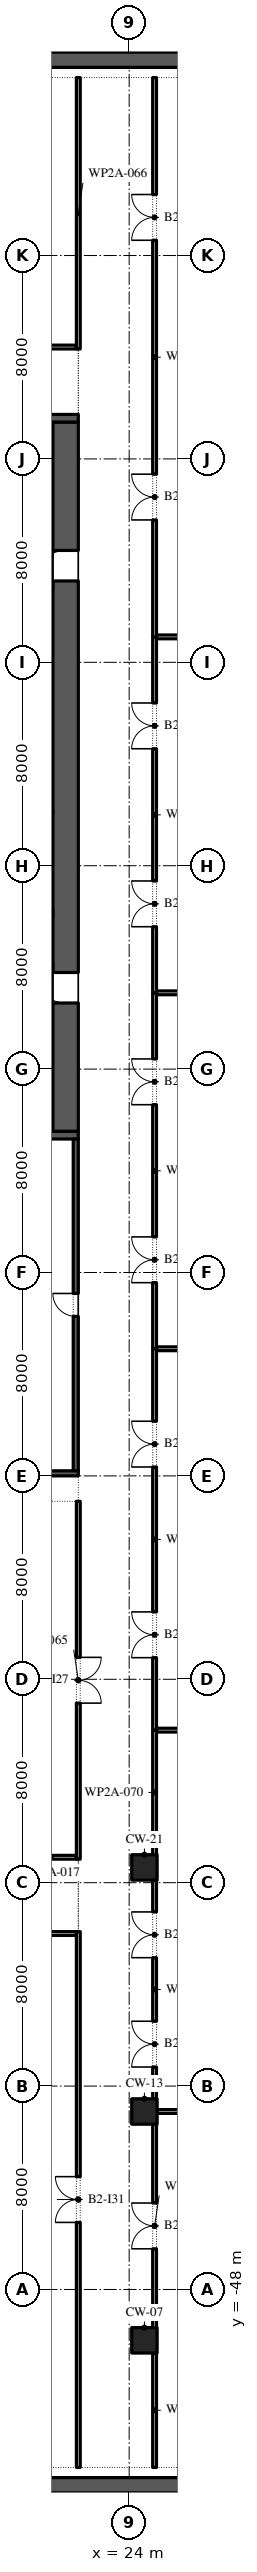
"""IFC4 building model, lengths in metres.
Left out: names, types, materials, properties, quantities, classifications, styles, units other than length and angle.
Written with IfcOpenShell. Run it as: python <this file> out.ifc"""

import sys

from ifc_helpers import new_model, si_unit, direction, frame, frame_2d, origin, origin_2d, place, context, subcontext, project, spatial, rectangle, extrude, element, fill, save


model = new_model("IFC4")
c1 = context("Model", 3, precision=1e-05, world=origin(), true_north=direction((0.0, 1.0)))
c2 = subcontext(c1, "Body", "Model", "MODEL_VIEW")
j1 = project(units=[si_unit("LENGTHUNIT", "METRE"), si_unit("PLANEANGLEUNIT", "RADIAN")], contexts=[c1])
p1 = place(None, origin())
s1 = spatial("IfcSite", under=j1, at=p1, CompositionType="ELEMENT")
p2 = place(p1, origin())
s2 = spatial("IfcBuilding", under=s1, at=p2, CompositionType="ELEMENT")
p3 = place(p2, frame((0.0, 0.0, -10.4)))
s3 = spatial("IfcBuildingStorey", under=s2, at=p3, CompositionType="ELEMENT", Elevation=-10.4)
for number, where, z_axis, x_axis in (
    (1, (-48.0, -55.7, -0.3), (0.0, 0.0, 1.0), (1.0, 0.0, 0.0)),
    (2, (-48.0, 39.7, -0.3), (0.0, 0.0, 1.0), (1.0, 0.0, 0.0)),
):
    element("IfcWall", number, at=place(p3, frame(where, z_axis=z_axis, x_axis=x_axis)), inside=s3, PredefinedType="SOLIDWALL", context=c2, shape_type="SweptSolid", body=[
        extrude(rectangle(XDim=96.0, YDim=0.6, at=frame_2d((48.0, 0.0))), origin(), (0.0, 0.0, 1.0), 5.5),
    ])
for number, where, z_axis, x_axis in (
    (3, (24.6, -50.0, -0.3), (0.0, 0.0, 1.0), (1.0, 0.0, 0.0)),
    (4, (24.6, -41.0, -0.3), (0.0, 0.0, 1.0), (1.0, 0.0, 0.0)),
    (5, (24.6, -31.4, -0.3), (0.0, 0.0, 1.0), (1.0, 0.0, 0.0)),
):
    element("IfcColumn", number, at=place(p3, frame(where, z_axis=z_axis, x_axis=x_axis)), inside=s3, PredefinedType="COLUMN", context=c2, shape_type="SweptSolid", body=[
        extrude(rectangle(XDim=1.0, YDim=1.0, at=origin_2d()), origin(), (0.0, 0.0, 1.0), 5.5),
    ])
p4 = place(p3, frame((21.5, -2.45, 0.0), z_axis=(0.0, 0.0, 1.0), x_axis=(0.0, 1.0, 0.0)))
e6 = element("IfcWall", 6, at=p4, inside=s3, PredefinedType="SHEAR", context=c2, shape_type="SweptSolid", body=[
    extrude(rectangle(XDim=27.9, YDim=1.0, at=frame_2d((13.95, 0.0))), origin(), (0.0, 0.0, 1.0), 4.9),
])
p5 = place(p4, frame((5.05, 0.0, 0.0)))
e7 = element("IfcOpeningElement", 7, at=p5, cuts=e6, PredefinedType="OPENING", context=c2, shape_type="SweptSolid", body=[
    extrude(rectangle(XDim=1.2, YDim=2.1, at=frame_2d((0.6, 1.05))), frame((0.0, 0.51, 0.0), z_axis=(0.0, -1.0, 0.0), x_axis=(1.0, 0.0, 0.0)), (0.0, 0.0, 1.0), 1.02),
])
p6 = place(p4, frame((21.65, 0.0, 0.0)))
e8 = element("IfcOpeningElement", 8, at=p6, cuts=e6, PredefinedType="OPENING", context=c2, shape_type="SweptSolid", body=[
    extrude(rectangle(XDim=1.2, YDim=2.1, at=frame_2d((0.6, 1.05))), frame((0.0, 0.51, 0.0), z_axis=(0.0, -1.0, 0.0), x_axis=(1.0, 0.0, 0.0)), (0.0, 0.0, 1.0), 1.02),
])
for number, where, z_axis, x_axis in (
    (9, (10.0, -2.6, 0.0), (0.0, 0.0, 1.0), (1.0, 0.0, 0.0)),
    (10, (10.0, 25.6, 0.0), (0.0, 0.0, 1.0), (1.0, 0.0, 0.0)),
):
    element("IfcWall", number, at=place(p3, frame(where, z_axis=z_axis, x_axis=x_axis)), inside=s3, PredefinedType="SHEAR", context=c2, shape_type="SweptSolid", body=[
        extrude(rectangle(XDim=12.0, YDim=0.3, at=frame_2d((6.0, 0.0))), origin(), (0.0, 0.0, 1.0), 4.9),
    ])
for number, where, z_axis, x_axis in (
    (11, (17.3, 4.0, 0.0), (0.0, 0.0, 1.0), (1.0, 0.0, 0.0)),
    (12, (17.3, 19.0, 0.0), (0.0, 0.0, 1.0), (1.0, 0.0, 0.0)),
):
    element("IfcWall", number, at=place(p3, frame(where, z_axis=z_axis, x_axis=x_axis)), inside=s3, PredefinedType="SHEAR", context=c2, shape_type="SweptSolid", body=[
        extrude(rectangle(XDim=3.7, YDim=0.3, at=frame_2d((1.85, 0.0))), origin(), (0.0, 0.0, 1.0), 4.9),
    ])
p7 = place(p3, frame((21.9, -15.8, 0.0), z_axis=(0.0, 0.0, 1.0), x_axis=(0.0, 1.0, 0.0)))
e13 = element("IfcWall", 13, at=p7, inside=s3, PredefinedType="SHEAR", context=c2, shape_type="SweptSolid", body=[
    extrude(rectangle(XDim=13.05, YDim=0.2, at=frame_2d((6.525, 0.0))), origin(), (0.0, 0.0, 1.0), 4.9),
])
p8 = place(p7, frame((6.075, 0.0, 0.0)))
e14 = element("IfcOpeningElement", 14, at=p8, cuts=e13, PredefinedType="OPENING", context=c2, shape_type="SweptSolid", body=[
    extrude(rectangle(XDim=0.9, YDim=2.1, at=frame_2d((0.45, 1.05))), frame((0.0, 0.11, 0.0), z_axis=(0.0, -1.0, 0.0), x_axis=(1.0, 0.0, 0.0)), (0.0, 0.0, 1.0), 0.22),
])
p9 = place(p3, frame((10.0, -15.9, 0.0), z_axis=(0.0, 0.0, 1.0), x_axis=(1.0, 0.0, 0.0)))
e15 = element("IfcWall", 15, at=p9, inside=s3, PredefinedType="SHEAR", context=c2, shape_type="SweptSolid", body=[
    extrude(rectangle(XDim=12.0, YDim=0.2, at=frame_2d((6.0, 0.0))), origin(), (0.0, 0.0, 1.0), 4.9),
])
p10 = place(p3, frame((25.1, -41.0, 0.0), z_axis=(0.0, 0.0, 1.0), x_axis=(1.0, 0.0, 0.0)))
e16 = element("IfcWall", 16, at=p10, inside=s3, PredefinedType="PARTITIONING", context=c2, shape_type="SweptSolid", body=[
    extrude(rectangle(XDim=5.8, YDim=0.15, at=frame_2d((2.9, 0.0))), origin(), (0.0, 0.0, 1.0), 4.9),
])
p11 = place(p3, frame((11.0, -34.0, 0.0), z_axis=(0.0, 0.0, 1.0), x_axis=(1.0, 0.0, 0.0)))
e17 = element("IfcWall", 17, at=p11, inside=s3, PredefinedType="PARTITIONING", context=c2, shape_type="SweptSolid", body=[
    extrude(rectangle(XDim=10.925, YDim=0.15, at=frame_2d((5.462, 0.0))), origin(), (0.0, 0.0, 1.0), 4.9),
])
p12 = place(p3, frame((19.9, -31.0, 0.0), z_axis=(0.0, 0.0, 1.0), x_axis=(1.0, 0.0, 0.0)))
e18 = element("IfcWall", 18, at=p12, inside=s3, PredefinedType="PARTITIONING", context=c2, shape_type="SweptSolid", body=[
    extrude(rectangle(XDim=2.025, YDim=0.15, at=frame_2d((1.013, 0.0))), origin(), (0.0, 0.0, 1.0), 4.9),
])
p13 = place(p3, frame((25.075, -26.0, 0.0), z_axis=(0.0, 0.0, 1.0), x_axis=(1.0, 0.0, 0.0)))
e19 = element("IfcWall", 19, at=p13, inside=s3, PredefinedType="PARTITIONING", context=c2, shape_type="SweptSolid", body=[
    extrude(rectangle(XDim=7.411, YDim=0.15, at=frame_2d((3.705, 0.0))), origin(), (0.0, 0.0, 1.0), 4.9),
])
p14 = place(p3, frame((25.075, -11.0, 0.0), z_axis=(0.0, 0.0, 1.0), x_axis=(1.0, 0.0, 0.0)))
e20 = element("IfcWall", 20, at=p14, inside=s3, PredefinedType="PARTITIONING", context=c2, shape_type="SweptSolid", body=[
    extrude(rectangle(XDim=6.625, YDim=0.15, at=frame_2d((3.312, 0.0))), origin(), (0.0, 0.0, 1.0), 4.9),
])
p15 = place(p3, frame((25.075, 3.0, 0.0), z_axis=(0.0, 0.0, 1.0), x_axis=(1.0, 0.0, 0.0)))
e21 = element("IfcWall", 21, at=p15, inside=s3, PredefinedType="PARTITIONING", context=c2, shape_type="SweptSolid", body=[
    extrude(rectangle(XDim=16.425, YDim=0.15, at=frame_2d((8.212, 0.0))), origin(), (0.0, 0.0, 1.0), 4.9),
])
p16 = place(p3, frame((25.075, 17.0, 0.0), z_axis=(0.0, 0.0, 1.0), x_axis=(1.0, 0.0, 0.0)))
e22 = element("IfcWall", 22, at=p16, inside=s3, PredefinedType="PARTITIONING", context=c2, shape_type="SweptSolid", body=[
    extrude(rectangle(XDim=21.925, YDim=0.15, at=frame_2d((10.962, 0.0))), origin(), (0.0, 0.0, 1.0), 4.9),
])
p17 = place(p3, frame((0.0, 28.4, 0.0), z_axis=(0.0, 0.0, 1.0), x_axis=(1.0, 0.0, 0.0)))
e23 = element("IfcWall", 23, at=p17, inside=s3, PredefinedType="PARTITIONING", context=c2, shape_type="SweptSolid", body=[
    extrude(rectangle(XDim=21.925, YDim=0.15, at=frame_2d((10.962, 0.0))), origin(), (0.0, 0.0, 1.0), 4.9),
])
p18 = place(p17, frame((10.062, 0.0, 0.0)))
e24 = element("IfcOpeningElement", 24, at=p18, cuts=e23, PredefinedType="OPENING", context=c2, shape_type="SweptSolid", body=[
    extrude(rectangle(XDim=1.8, YDim=2.1, at=frame_2d((0.9, 1.05))), frame((0.0, 0.085, 0.0), z_axis=(0.0, -1.0, 0.0), x_axis=(1.0, 0.0, 0.0)), (0.0, 0.0, 1.0), 0.17),
])
p19 = place(p3, frame((22.0, -55.0, 0.0), z_axis=(0.0, 0.0, 1.0), x_axis=(0.0, 1.0, 0.0)))
e25 = element("IfcWall", 25, at=p19, inside=s3, PredefinedType="PARTITIONING", context=c2, shape_type="SweptSolid", body=[
    extrude(rectangle(XDim=21.075, YDim=0.15, at=frame_2d((10.538, 0.0))), origin(), (0.0, 0.0, 1.0), 4.9),
])
p20 = place(p19, frame((9.637, 0.0, 0.0)))
e26 = element("IfcOpeningElement", 26, at=p20, cuts=e25, PredefinedType="OPENING", context=c2, shape_type="SweptSolid", body=[
    extrude(rectangle(XDim=1.8, YDim=2.1, at=frame_2d((0.9, 1.05))), frame((0.0, 0.085, 0.0), z_axis=(0.0, -1.0, 0.0), x_axis=(1.0, 0.0, 0.0)), (0.0, 0.0, 1.0), 0.17),
])
p21 = place(p3, frame((22.0, -31.075, 0.0), z_axis=(0.0, 0.0, 1.0), x_axis=(0.0, 1.0, 0.0)))
e27 = element("IfcWall", 27, at=p21, inside=s3, PredefinedType="PARTITIONING", context=c2, shape_type="SweptSolid", body=[
    extrude(rectangle(XDim=14.075, YDim=0.15, at=frame_2d((7.038, 0.0))), origin(), (0.0, 0.0, 1.0), 4.9),
])
p22 = place(p21, frame((6.137, 0.0, 0.0)))
e28 = element("IfcOpeningElement", 28, at=p22, cuts=e27, PredefinedType="OPENING", context=c2, shape_type="SweptSolid", body=[
    extrude(rectangle(XDim=1.8, YDim=2.1, at=frame_2d((0.9, 1.05))), frame((0.0, 0.085, 0.0), z_axis=(0.0, -1.0, 0.0), x_axis=(1.0, 0.0, 0.0)), (0.0, 0.0, 1.0), 0.17),
])
p23 = place(p3, frame((22.0, 28.325, 0.0), z_axis=(0.0, 0.0, 1.0), x_axis=(0.0, 1.0, 0.0)))
e29 = element("IfcWall", 29, at=p23, inside=s3, PredefinedType="PARTITIONING", context=c2, shape_type="SweptSolid", body=[
    extrude(rectangle(XDim=10.675, YDim=0.15, at=frame_2d((5.337, 0.0))), origin(), (0.0, 0.0, 1.0), 4.9),
])
p24 = place(p3, frame((25.0, -55.0, 0.0), z_axis=(0.0, 0.0, 1.0), x_axis=(0.0, 1.0, 0.0)))
e30 = element("IfcWall", 30, at=p24, inside=s3, PredefinedType="PARTITIONING", context=c2, shape_type="SweptSolid", body=[
    extrude(rectangle(XDim=4.5, YDim=0.15, at=frame_2d((2.25, 0.0))), origin(), (0.0, 0.0, 1.0), 4.9),
])
p25 = place(p3, frame((25.0, -49.5, 0.0), z_axis=(0.0, 0.0, 1.0), x_axis=(0.0, 1.0, 0.0)))
e31 = element("IfcWall", 31, at=p25, inside=s3, PredefinedType="PARTITIONING", context=c2, shape_type="SweptSolid", body=[
    extrude(rectangle(XDim=8.0, YDim=0.15, at=frame_2d((4.0, 0.0))), origin(), (0.0, 0.0, 1.0), 4.9),
])
p26 = place(p25, frame((3.1, 0.0, 0.0)))
e32 = element("IfcOpeningElement", 32, at=p26, cuts=e31, PredefinedType="OPENING", context=c2, shape_type="SweptSolid", body=[
    extrude(rectangle(XDim=1.8, YDim=2.1, at=frame_2d((0.9, 1.05))), frame((0.0, 0.085, 0.0), z_axis=(0.0, -1.0, 0.0), x_axis=(1.0, 0.0, 0.0)), (0.0, 0.0, 1.0), 0.17),
])
p27 = place(p3, frame((25.0, -40.5, 0.0), z_axis=(0.0, 0.0, 1.0), x_axis=(0.0, 1.0, 0.0)))
e33 = element("IfcWall", 33, at=p27, inside=s3, PredefinedType="PARTITIONING", context=c2, shape_type="SweptSolid", body=[
    extrude(rectangle(XDim=8.6, YDim=0.15, at=frame_2d((4.3, 0.0))), origin(), (0.0, 0.0, 1.0), 4.9),
])
p28 = place(p27, frame((1.25, 0.0, 0.0)))
e34 = element("IfcOpeningElement", 34, at=p28, cuts=e33, PredefinedType="OPENING", context=c2, shape_type="SweptSolid", body=[
    extrude(rectangle(XDim=1.8, YDim=2.1, at=frame_2d((0.9, 1.05))), frame((0.0, 0.085, 0.0), z_axis=(0.0, -1.0, 0.0), x_axis=(1.0, 0.0, 0.0)), (0.0, 0.0, 1.0), 0.17),
])
p29 = place(p27, frame((5.55, 0.0, 0.0)))
e35 = element("IfcOpeningElement", 35, at=p29, cuts=e33, PredefinedType="OPENING", context=c2, shape_type="SweptSolid", body=[
    extrude(rectangle(XDim=1.8, YDim=2.1, at=frame_2d((0.9, 1.05))), frame((0.0, 0.085, 0.0), z_axis=(0.0, -1.0, 0.0), x_axis=(1.0, 0.0, 0.0)), (0.0, 0.0, 1.0), 0.17),
])
p30 = place(p3, frame((25.0, -30.9, 0.0), z_axis=(0.0, 0.0, 1.0), x_axis=(0.0, 1.0, 0.0)))
e36 = element("IfcWall", 36, at=p30, inside=s3, PredefinedType="PARTITIONING", context=c2, shape_type="SweptSolid", body=[
    extrude(rectangle(XDim=4.9, YDim=0.15, at=frame_2d((2.45, 0.0))), origin(), (0.0, 0.0, 1.0), 4.9),
])
p31 = place(p3, frame((25.0, -26.0, 0.0), z_axis=(0.0, 0.0, 1.0), x_axis=(0.0, 1.0, 0.0)))
e37 = element("IfcWall", 37, at=p31, inside=s3, PredefinedType="PARTITIONING", context=c2, shape_type="SweptSolid", body=[
    extrude(rectangle(XDim=15.0, YDim=0.15, at=frame_2d((7.5, 0.0))), origin(), (0.0, 0.0, 1.0), 4.9),
])
p32 = place(p31, frame((2.85, 0.0, 0.0)))
e38 = element("IfcOpeningElement", 38, at=p32, cuts=e37, PredefinedType="OPENING", context=c2, shape_type="SweptSolid", body=[
    extrude(rectangle(XDim=1.8, YDim=2.1, at=frame_2d((0.9, 1.05))), frame((0.0, 0.085, 0.0), z_axis=(0.0, -1.0, 0.0), x_axis=(1.0, 0.0, 0.0)), (0.0, 0.0, 1.0), 0.17),
])
p33 = place(p31, frame((10.35, 0.0, 0.0)))
e39 = element("IfcOpeningElement", 39, at=p33, cuts=e37, PredefinedType="OPENING", context=c2, shape_type="SweptSolid", body=[
    extrude(rectangle(XDim=1.8, YDim=2.1, at=frame_2d((0.9, 1.05))), frame((0.0, 0.085, 0.0), z_axis=(0.0, -1.0, 0.0), x_axis=(1.0, 0.0, 0.0)), (0.0, 0.0, 1.0), 0.17),
])
p34 = place(p3, frame((25.0, -11.0, 0.0), z_axis=(0.0, 0.0, 1.0), x_axis=(0.0, 1.0, 0.0)))
e40 = element("IfcWall", 40, at=p34, inside=s3, PredefinedType="PARTITIONING", context=c2, shape_type="SweptSolid", body=[
    extrude(rectangle(XDim=14.0, YDim=0.15, at=frame_2d((7.0, 0.0))), origin(), (0.0, 0.0, 1.0), 4.9),
])
p35 = place(p34, frame((2.6, 0.0, 0.0)))
e41 = element("IfcOpeningElement", 41, at=p35, cuts=e40, PredefinedType="OPENING", context=c2, shape_type="SweptSolid", body=[
    extrude(rectangle(XDim=1.8, YDim=2.1, at=frame_2d((0.9, 1.05))), frame((0.0, 0.085, 0.0), z_axis=(0.0, -1.0, 0.0), x_axis=(1.0, 0.0, 0.0)), (0.0, 0.0, 1.0), 0.17),
])
p36 = place(p34, frame((9.6, 0.0, 0.0)))
e42 = element("IfcOpeningElement", 42, at=p36, cuts=e40, PredefinedType="OPENING", context=c2, shape_type="SweptSolid", body=[
    extrude(rectangle(XDim=1.8, YDim=2.1, at=frame_2d((0.9, 1.05))), frame((0.0, 0.085, 0.0), z_axis=(0.0, -1.0, 0.0), x_axis=(1.0, 0.0, 0.0)), (0.0, 0.0, 1.0), 0.17),
])
p37 = place(p3, frame((25.0, 3.0, 0.0), z_axis=(0.0, 0.0, 1.0), x_axis=(0.0, 1.0, 0.0)))
e43 = element("IfcWall", 43, at=p37, inside=s3, PredefinedType="PARTITIONING", context=c2, shape_type="SweptSolid", body=[
    extrude(rectangle(XDim=14.0, YDim=0.15, at=frame_2d((7.0, 0.0))), origin(), (0.0, 0.0, 1.0), 4.9),
])
p38 = place(p37, frame((2.6, 0.0, 0.0)))
e44 = element("IfcOpeningElement", 44, at=p38, cuts=e43, PredefinedType="OPENING", context=c2, shape_type="SweptSolid", body=[
    extrude(rectangle(XDim=1.8, YDim=2.1, at=frame_2d((0.9, 1.05))), frame((0.0, 0.085, 0.0), z_axis=(0.0, -1.0, 0.0), x_axis=(1.0, 0.0, 0.0)), (0.0, 0.0, 1.0), 0.17),
])
p39 = place(p37, frame((9.6, 0.0, 0.0)))
e45 = element("IfcOpeningElement", 45, at=p39, cuts=e43, PredefinedType="OPENING", context=c2, shape_type="SweptSolid", body=[
    extrude(rectangle(XDim=1.8, YDim=2.1, at=frame_2d((0.9, 1.05))), frame((0.0, 0.085, 0.0), z_axis=(0.0, -1.0, 0.0), x_axis=(1.0, 0.0, 0.0)), (0.0, 0.0, 1.0), 0.17),
])
p40 = place(p3, frame((25.0, 17.0, 0.0), z_axis=(0.0, 0.0, 1.0), x_axis=(0.0, 1.0, 0.0)))
e46 = element("IfcWall", 46, at=p40, inside=s3, PredefinedType="PARTITIONING", context=c2, shape_type="SweptSolid", body=[
    extrude(rectangle(XDim=22.0, YDim=0.15, at=frame_2d((11.0, 0.0))), origin(), (0.0, 0.0, 1.0), 4.9),
])
p41 = place(p40, frame((4.6, 0.0, 0.0)))
e47 = element("IfcOpeningElement", 47, at=p41, cuts=e46, PredefinedType="OPENING", context=c2, shape_type="SweptSolid", body=[
    extrude(rectangle(XDim=1.8, YDim=2.1, at=frame_2d((0.9, 1.05))), frame((0.0, 0.085, 0.0), z_axis=(0.0, -1.0, 0.0), x_axis=(1.0, 0.0, 0.0)), (0.0, 0.0, 1.0), 0.17),
])
p42 = place(p40, frame((15.6, 0.0, 0.0)))
e48 = element("IfcOpeningElement", 48, at=p42, cuts=e46, PredefinedType="OPENING", context=c2, shape_type="SweptSolid", body=[
    extrude(rectangle(XDim=1.8, YDim=2.1, at=frame_2d((0.9, 1.05))), frame((0.0, 0.085, 0.0), z_axis=(0.0, -1.0, 0.0), x_axis=(1.0, 0.0, 0.0)), (0.0, 0.0, 1.0), 0.17),
])
p43 = place(p5, origin())
e49 = element("IfcDoor", 49, at=p43, inside=s3, OperationType="SINGLE_SWING_LEFT", PredefinedType="DOOR", context=c2, shape_type="SweptSolid", body=[
    extrude(rectangle(XDim=1.2, YDim=2.1, at=frame_2d((0.6, 1.05))), frame((0.0, 0.025, 0.0), z_axis=(0.0, -1.0, 0.0), x_axis=(1.0, 0.0, 0.0)), (0.0, 0.0, 1.0), 0.05),
])
fill(e7, e49)
p44 = place(p6, origin())
e50 = element("IfcDoor", 50, at=p44, inside=s3, OperationType="SINGLE_SWING_RIGHT", PredefinedType="DOOR", context=c2, shape_type="SweptSolid", body=[
    extrude(rectangle(XDim=1.2, YDim=2.1, at=frame_2d((0.6, 1.05))), frame((0.0, 0.025, 0.0), z_axis=(0.0, -1.0, 0.0), x_axis=(1.0, 0.0, 0.0)), (0.0, 0.0, 1.0), 0.05),
])
fill(e8, e50)
p45 = place(p8, origin())
e51 = element("IfcDoor", 51, at=p45, inside=s3, OperationType="SINGLE_SWING_LEFT", PredefinedType="DOOR", context=c2, shape_type="SweptSolid", body=[
    extrude(rectangle(XDim=0.9, YDim=2.1, at=frame_2d((0.45, 1.05))), frame((0.0, 0.1, 0.0), z_axis=(0.0, -1.0, 0.0), x_axis=(1.0, 0.0, 0.0)), (0.0, 0.0, 1.0), 0.05),
])
fill(e14, e51)
p46 = place(p26, origin())
e52 = element("IfcDoor", 52, at=p46, inside=s3, OperationType="SINGLE_SWING_LEFT", PredefinedType="DOOR", context=c2, shape_type="SweptSolid", body=[
    extrude(rectangle(XDim=1.8, YDim=2.1, at=frame_2d((0.9, 1.05))), frame((0.0, 0.025, 0.0), z_axis=(0.0, -1.0, 0.0), x_axis=(1.0, 0.0, 0.0)), (0.0, 0.0, 1.0), 0.05),
])
fill(e32, e52)
p47 = place(p28, origin())
e53 = element("IfcDoor", 53, at=p47, inside=s3, OperationType="SINGLE_SWING_RIGHT", PredefinedType="DOOR", context=c2, shape_type="SweptSolid", body=[
    extrude(rectangle(XDim=1.8, YDim=2.1, at=frame_2d((0.9, 1.05))), frame((0.0, 0.025, 0.0), z_axis=(0.0, -1.0, 0.0), x_axis=(1.0, 0.0, 0.0)), (0.0, 0.0, 1.0), 0.05),
])
fill(e34, e53)
p48 = place(p29, origin())
e54 = element("IfcDoor", 54, at=p48, inside=s3, OperationType="SINGLE_SWING_RIGHT", PredefinedType="DOOR", context=c2, shape_type="SweptSolid", body=[
    extrude(rectangle(XDim=1.8, YDim=2.1, at=frame_2d((0.9, 1.05))), frame((0.0, 0.025, 0.0), z_axis=(0.0, -1.0, 0.0), x_axis=(1.0, 0.0, 0.0)), (0.0, 0.0, 1.0), 0.05),
])
fill(e35, e54)
p49 = place(p32, origin())
e55 = element("IfcDoor", 55, at=p49, inside=s3, OperationType="SINGLE_SWING_RIGHT", PredefinedType="DOOR", context=c2, shape_type="SweptSolid", body=[
    extrude(rectangle(XDim=1.8, YDim=2.1, at=frame_2d((0.9, 1.05))), frame((0.0, 0.025, 0.0), z_axis=(0.0, -1.0, 0.0), x_axis=(1.0, 0.0, 0.0)), (0.0, 0.0, 1.0), 0.05),
])
fill(e38, e55)
p50 = place(p33, origin())
e56 = element("IfcDoor", 56, at=p50, inside=s3, OperationType="SINGLE_SWING_RIGHT", PredefinedType="DOOR", context=c2, shape_type="SweptSolid", body=[
    extrude(rectangle(XDim=1.8, YDim=2.1, at=frame_2d((0.9, 1.05))), frame((0.0, 0.025, 0.0), z_axis=(0.0, -1.0, 0.0), x_axis=(1.0, 0.0, 0.0)), (0.0, 0.0, 1.0), 0.05),
])
fill(e39, e56)
p51 = place(p35, origin())
e57 = element("IfcDoor", 57, at=p51, inside=s3, OperationType="SINGLE_SWING_LEFT", PredefinedType="DOOR", context=c2, shape_type="SweptSolid", body=[
    extrude(rectangle(XDim=1.8, YDim=2.1, at=frame_2d((0.9, 1.05))), frame((0.0, 0.025, 0.0), z_axis=(0.0, -1.0, 0.0), x_axis=(1.0, 0.0, 0.0)), (0.0, 0.0, 1.0), 0.05),
])
fill(e41, e57)
p52 = place(p36, origin())
e58 = element("IfcDoor", 58, at=p52, inside=s3, OperationType="SINGLE_SWING_LEFT", PredefinedType="DOOR", context=c2, shape_type="SweptSolid", body=[
    extrude(rectangle(XDim=1.8, YDim=2.1, at=frame_2d((0.9, 1.05))), frame((0.0, 0.025, 0.0), z_axis=(0.0, -1.0, 0.0), x_axis=(1.0, 0.0, 0.0)), (0.0, 0.0, 1.0), 0.05),
])
fill(e42, e58)
p53 = place(p38, origin())
e59 = element("IfcDoor", 59, at=p53, inside=s3, OperationType="SINGLE_SWING_LEFT", PredefinedType="DOOR", context=c2, shape_type="SweptSolid", body=[
    extrude(rectangle(XDim=1.8, YDim=2.1, at=frame_2d((0.9, 1.05))), frame((0.0, 0.025, 0.0), z_axis=(0.0, -1.0, 0.0), x_axis=(1.0, 0.0, 0.0)), (0.0, 0.0, 1.0), 0.05),
])
fill(e44, e59)
p54 = place(p39, origin())
e60 = element("IfcDoor", 60, at=p54, inside=s3, OperationType="SINGLE_SWING_LEFT", PredefinedType="DOOR", context=c2, shape_type="SweptSolid", body=[
    extrude(rectangle(XDim=1.8, YDim=2.1, at=frame_2d((0.9, 1.05))), frame((0.0, 0.025, 0.0), z_axis=(0.0, -1.0, 0.0), x_axis=(1.0, 0.0, 0.0)), (0.0, 0.0, 1.0), 0.05),
])
fill(e45, e60)
p55 = place(p41, origin())
e61 = element("IfcDoor", 61, at=p55, inside=s3, OperationType="SINGLE_SWING_RIGHT", PredefinedType="DOOR", context=c2, shape_type="SweptSolid", body=[
    extrude(rectangle(XDim=1.8, YDim=2.1, at=frame_2d((0.9, 1.05))), frame((0.0, 0.025, 0.0), z_axis=(0.0, -1.0, 0.0), x_axis=(1.0, 0.0, 0.0)), (0.0, 0.0, 1.0), 0.05),
])
fill(e47, e61)
p56 = place(p42, origin())
e62 = element("IfcDoor", 62, at=p56, inside=s3, OperationType="SINGLE_SWING_RIGHT", PredefinedType="DOOR", context=c2, shape_type="SweptSolid", body=[
    extrude(rectangle(XDim=1.8, YDim=2.1, at=frame_2d((0.9, 1.05))), frame((0.0, 0.025, 0.0), z_axis=(0.0, -1.0, 0.0), x_axis=(1.0, 0.0, 0.0)), (0.0, 0.0, 1.0), 0.05),
])
fill(e48, e62)
p57 = place(p22, frame((1.8, 0.0, 0.0), z_axis=(0.0, 0.0, 1.0), x_axis=(-1.0, 0.0, 0.0)))
e63 = element("IfcDoor", 63, at=p57, inside=s3, OperationType="SINGLE_SWING_LEFT", PredefinedType="DOOR", context=c2, shape_type="SweptSolid", body=[
    extrude(rectangle(XDim=1.8, YDim=2.1, at=frame_2d((0.9, 1.05))), frame((0.0, 0.025, 0.0), z_axis=(0.0, -1.0, 0.0), x_axis=(1.0, 0.0, 0.0)), (0.0, 0.0, 1.0), 0.05),
])
fill(e28, e63)
p58 = place(p20, origin())
e64 = element("IfcDoor", 64, at=p58, inside=s3, OperationType="SINGLE_SWING_RIGHT", PredefinedType="DOOR", context=c2, shape_type="SweptSolid", body=[
    extrude(rectangle(XDim=1.8, YDim=2.1, at=frame_2d((0.9, 1.05))), frame((0.0, 0.025, 0.0), z_axis=(0.0, -1.0, 0.0), x_axis=(1.0, 0.0, 0.0)), (0.0, 0.0, 1.0), 0.05),
])
fill(e26, e64)
save(model, sys.argv[1])
